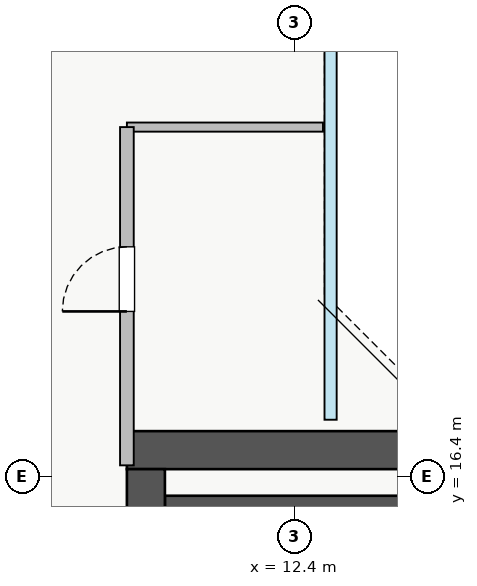
"""IFC4 building model, lengths in metres.
Left out: names, types, materials, properties, quantities, classifications, styles, units other than length and angle.
Written with IfcOpenShell. Run it as: python <this file> out.ifc"""

import sys

from ifc_helpers import new_model, si_unit, direction, frame, frame_2d, origin, place, context, subcontext, project, spatial, rectangle, extrude, source, transform, mapped, element, fill, save


model = new_model("IFC4")
c1 = context("Model", 3, precision=1e-05, world=origin(), true_north=direction((0.0, 1.0)))
c2 = subcontext(c1, "Body", "Model", "MODEL_VIEW")
j1 = project(units=[si_unit("LENGTHUNIT", "METRE"), si_unit("PLANEANGLEUNIT", "RADIAN")], contexts=[c1])
p1 = place(None, origin())
s1 = spatial("IfcSite", under=j1, at=p1, CompositionType="ELEMENT")
p2 = place(p1, origin())
s2 = spatial("IfcBuilding", under=s1, at=p2, CompositionType="ELEMENT")
p3 = place(p2, frame((0.0, 0.0, 213.25)))
s3 = spatial("IfcBuildingStorey", under=s2, at=p3, CompositionType="ELEMENT", Elevation=213.25)
p4 = place(p3, frame((10.7, 16.05, 0.0), z_axis=(0.0, 0.0, 1.0), x_axis=(1.0, 0.0, 0.0)))
e1 = element("IfcWall", 1, at=p4, inside=s3, PredefinedType="SHEAR", context=c2, shape_type="SweptSolid", body=[
    extrude(rectangle(XDim=7.45, YDim=0.2, at=frame_2d((3.725, 0.0))), origin(), (0.0, 0.0, 1.0), 3.25),
])
p5 = place(p3, frame((10.2, 16.75, 0.0), z_axis=(0.0, 0.0, 1.0), x_axis=(1.0, 0.0, 0.0)))
e2 = element("IfcWall", 2, at=p5, inside=s3, PredefinedType="SHEAR", context=c2, shape_type="SweptSolid", body=[
    extrude(rectangle(XDim=17.6, YDim=0.5, at=frame_2d((8.8, 0.0))), origin(), (0.0, 0.0, 1.0), 3.25),
])
p6 = place(p3, frame((10.45, 10.3, 0.0), z_axis=(0.0, 0.0, 1.0), x_axis=(0.0, 1.0, 0.0)))
e3 = element("IfcWall", 3, at=p6, inside=s3, PredefinedType="SHEAR", context=c2, shape_type="SweptSolid", body=[
    extrude(rectangle(XDim=6.2, YDim=0.5, at=frame_2d((3.1, 0.0))), origin(), (0.0, 0.0, 1.0), 3.25),
])
p7 = place(p3, frame((10.2, 21.0, 0.0), z_axis=(0.0, 0.0, 1.0), x_axis=(1.0, 0.0, 0.0)))
e4 = element("IfcWall", 4, at=p7, inside=s3, PredefinedType="PLUMBINGWALL", context=c2, shape_type="SweptSolid", body=[
    extrude(rectangle(XDim=2.58, YDim=0.12, at=frame_2d((1.29, 0.0))), origin(), (0.0, 0.0, 1.0), 3.07),
])
p8 = place(p3, frame((10.2, 16.55, 0.0), z_axis=(0.0, 0.0, 1.0), x_axis=(0.0, 1.0, 0.0)))
e5 = element("IfcWall", 5, at=p8, inside=s3, PredefinedType="PARTITIONING", context=c2, shape_type="SweptSolid", body=[
    extrude(rectangle(XDim=4.45, YDim=0.18, at=frame_2d((2.225, 0.0))), origin(), (0.0, 0.0, 1.0), 3.07),
])
p9 = place(p8, frame((2.025, 0.0, 0.0)))
e6 = element("IfcOpeningElement", 6, at=p9, cuts=e5, PredefinedType="OPENING", context=c2, shape_type="SweptSolid", body=[
    extrude(rectangle(XDim=0.85, YDim=2.05, at=frame_2d((0.425, 1.025))), frame((0.0, 0.1, 0.0), z_axis=(0.0, -1.0, 0.0), x_axis=(1.0, 0.0, 0.0)), (0.0, 0.0, 1.0), 0.2),
])
m1 = source(origin(), c2, "Body", "SweptSolid", [
    extrude(rectangle(XDim=0.85, YDim=2.05, at=frame_2d((0.425, 1.025))), frame((0.0, 0.025, 0.0), z_axis=(0.0, -1.0, 0.0), x_axis=(1.0, 0.0, 0.0)), (0.0, 0.0, 1.0), 0.05),
])
p10 = place(p9, origin())
e7 = element("IfcDoor", 7, at=p10, inside=s3, OperationType="SINGLE_SWING_LEFT", PredefinedType="DOOR", context=c2, shape_type="MappedRepresentation", body=[
    mapped(m1, transform((0.0, 0.0, 0.0), x_axis=(1.0, 0.0, 0.0), y_axis=(0.0, 1.0, 0.0), z_axis=(0.0, 0.0, 1.0), scale=1.0)),
])
fill(e6, e7)
save(model, sys.argv[1])
